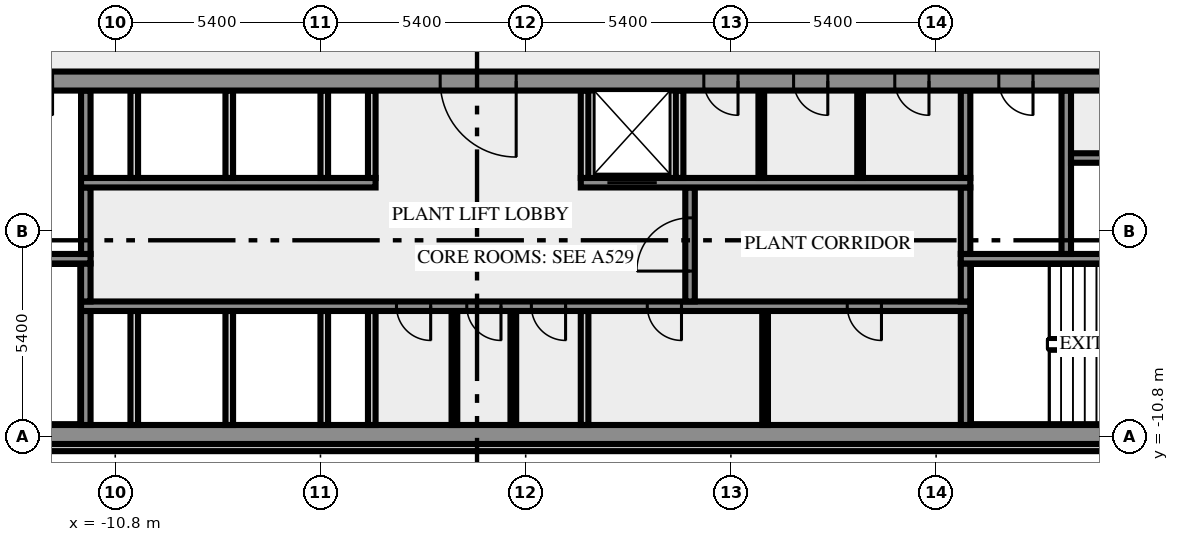
"""IFC4 building model, lengths in metres.
Left out: names, types, materials, properties, quantities, classifications, styles, units other than length and angle.
Written with IfcOpenShell. Run it as: python <this file> out.ifc"""

import sys

from ifc_helpers import new_model, si_unit, direction, frame, frame_2d, origin, place, context, subcontext, project, spatial, rectangle, extrude, element, fill, save


model = new_model("IFC4")
c1 = context("Model", 3, precision=1e-05, world=origin(), true_north=direction((0.0, 1.0)))
c2 = subcontext(c1, "Body", "Model", "MODEL_VIEW")
j1 = project(units=[si_unit("LENGTHUNIT", "METRE"), si_unit("PLANEANGLEUNIT", "RADIAN")], contexts=[c1])
p1 = place(None, origin())
s1 = spatial("IfcSite", under=j1, at=p1, CompositionType="ELEMENT")
p2 = place(p1, origin())
s2 = spatial("IfcBuilding", under=s1, at=p2, CompositionType="ELEMENT")
p3 = place(p2, frame((0.0, 0.0, 355.0)))
s3 = spatial("IfcBuildingStorey", under=s2, at=p3, CompositionType="ELEMENT", Elevation=355.0)
p4 = place(p3, frame((-17.444, -11.088, 0.0), z_axis=(0.0, 0.0, 1.0), x_axis=(1.0, 0.0, 0.0)))
e1 = element("IfcWall", 1, at=p4, inside=s3, PredefinedType="SOLIDWALL", context=c2, shape_type="SweptSolid", body=[
    extrude(rectangle(XDim=34.888, YDim=0.2, at=frame_2d((17.444, 0.0))), origin(), (0.0, 0.0, 1.0), 7.55),
])
p5 = place(p3, frame((-20.0, -10.75, 0.0), z_axis=(0.0, 0.0, 1.0), x_axis=(1.0, 0.0, 0.0)))
e2 = element("IfcWall", 2, at=p5, inside=s3, PredefinedType="SHEAR", context=c2, shape_type="SweptSolid", body=[
    extrude(rectangle(XDim=40.0, YDim=0.5, at=frame_2d((20.0, 0.0))), origin(), (0.0, 0.0, 1.0), 7.55),
])
p6 = place(p5, frame((0.8, 0.0, 1.0)))
e3 = element("IfcOpeningElement", 3, at=p6, cuts=e2, PredefinedType="OPENING", context=c2, shape_type="SweptSolid", body=[
    extrude(rectangle(XDim=1.2, YDim=1.2, at=frame_2d((0.6, 0.6))), frame((0.0, 0.26, 0.0), z_axis=(0.0, -1.0, 0.0), x_axis=(1.0, 0.0, 0.0)), (0.0, 0.0, 1.0), 0.52),
])
p7 = place(p5, frame((38.0, 0.0, 1.0)))
e4 = element("IfcOpeningElement", 4, at=p7, cuts=e2, PredefinedType="OPENING", context=c2, shape_type="SweptSolid", body=[
    extrude(rectangle(XDim=1.2, YDim=1.2, at=frame_2d((0.6, 0.6))), frame((0.0, 0.26, 0.0), z_axis=(0.0, -1.0, 0.0), x_axis=(1.0, 0.0, 0.0)), (0.0, 0.0, 1.0), 0.52),
])
p8 = place(p3, frame((-11.575, -10.5, 0.0), z_axis=(0.0, 0.0, 1.0), x_axis=(0.0, 1.0, 0.0)))
e5 = element("IfcWall", 5, at=p8, inside=s3, PredefinedType="SHEAR", context=c2, shape_type="SweptSolid", body=[
    extrude(rectangle(XDim=3.0, YDim=0.25, at=frame_2d((1.5, 0.0))), origin(), (0.0, 0.0, 1.0), 7.55),
])
for number, where, z_axis, x_axis in (
    (6, (-10.3, -10.5, 0.0), (0.0, 0.0, 1.0), (0.0, 1.0, 0.0)),
    (7, (-7.8, -10.5, 0.0), (0.0, 0.0, 1.0), (0.0, 1.0, 0.0)),
    (8, (-5.3, -10.5, 0.0), (0.0, 0.0, 1.0), (0.0, 1.0, 0.0)),
    (9, (-4.05, -10.5, 0.0), (0.0, 0.0, 1.0), (0.0, 1.0, 0.0)),
):
    element("IfcWall", number, at=place(p3, frame(where, z_axis=z_axis, x_axis=x_axis)), inside=s3, PredefinedType="SOLIDWALL", context=c2, shape_type="SweptSolid", body=[
        extrude(rectangle(XDim=3.0, YDim=0.2, at=frame_2d((1.5, 0.0))), origin(), (0.0, 0.0, 1.0), 7.55),
    ])
for number, where, z_axis, x_axis in (
    (10, (-1.875, -10.5, 0.0), (0.0, 0.0, 1.0), (0.0, 1.0, 0.0)),
    (11, (-0.325, -10.5, 0.0), (0.0, 0.0, 1.0), (0.0, 1.0, 0.0)),
):
    element("IfcWall", number, at=place(p3, frame(where, z_axis=z_axis, x_axis=x_axis)), inside=s3, PredefinedType="PARTITIONING", context=c2, shape_type="SweptSolid", body=[
        extrude(rectangle(XDim=3.0, YDim=0.15, at=frame_2d((1.5, 0.0))), origin(), (0.0, 0.0, 1.0), 7.55),
    ])
p9 = place(p3, frame((1.55, -10.5, 0.0), z_axis=(0.0, 0.0, 1.0), x_axis=(0.0, 1.0, 0.0)))
e12 = element("IfcWall", 12, at=p9, inside=s3, PredefinedType="SOLIDWALL", context=c2, shape_type="SweptSolid", body=[
    extrude(rectangle(XDim=3.0, YDim=0.2, at=frame_2d((1.5, 0.0))), origin(), (0.0, 0.0, 1.0), 7.55),
])
p10 = place(p3, frame((6.3, -10.5, 0.0), z_axis=(0.0, 0.0, 1.0), x_axis=(0.0, 1.0, 0.0)))
e13 = element("IfcWall", 13, at=p10, inside=s3, PredefinedType="PARTITIONING", context=c2, shape_type="SweptSolid", body=[
    extrude(rectangle(XDim=3.0, YDim=0.15, at=frame_2d((1.5, 0.0))), origin(), (0.0, 0.0, 1.0), 7.55),
])
p11 = place(p3, frame((11.575, -10.5, 0.0), z_axis=(0.0, 0.0, 1.0), x_axis=(0.0, 1.0, 0.0)))
e14 = element("IfcWall", 14, at=p11, inside=s3, PredefinedType="SHEAR", context=c2, shape_type="SweptSolid", body=[
    extrude(rectangle(XDim=3.0, YDim=0.25, at=frame_2d((1.5, 0.0))), origin(), (0.0, 0.0, 1.0), 7.55),
])
p12 = place(p3, frame((11.7, -7.375, 0.0), z_axis=(0.0, 0.0, 1.0), x_axis=(-1.0, 0.0, 0.0)))
e15 = element("IfcWall", 15, at=p12, inside=s3, PredefinedType="SHEAR", context=c2, shape_type="SweptSolid", body=[
    extrude(rectangle(XDim=23.4, YDim=0.25, at=frame_2d((11.7, 0.0))), origin(), (0.0, 0.0, 1.0), 7.55),
])
p13 = place(p12, frame((14.2, 0.0, 0.0)))
e16 = element("IfcOpeningElement", 16, at=p13, cuts=e15, PredefinedType="OPENING", context=c2, shape_type="SweptSolid", body=[
    extrude(rectangle(XDim=0.9, YDim=2.1, at=frame_2d((0.45, 1.05))), frame((0.0, 0.135, 0.0), z_axis=(0.0, -1.0, 0.0), x_axis=(1.0, 0.0, 0.0)), (0.0, 0.0, 1.0), 0.27),
])
p14 = place(p12, frame((12.35, 0.0, 0.0)))
e17 = element("IfcOpeningElement", 17, at=p14, cuts=e15, PredefinedType="OPENING", context=c2, shape_type="SweptSolid", body=[
    extrude(rectangle(XDim=0.9, YDim=2.1, at=frame_2d((0.45, 1.05))), frame((0.0, 0.135, 0.0), z_axis=(0.0, -1.0, 0.0), x_axis=(1.0, 0.0, 0.0)), (0.0, 0.0, 1.0), 0.27),
])
p15 = place(p12, frame((10.65, 0.0, 0.0)))
e18 = element("IfcOpeningElement", 18, at=p15, cuts=e15, PredefinedType="OPENING", context=c2, shape_type="SweptSolid", body=[
    extrude(rectangle(XDim=0.9, YDim=2.1, at=frame_2d((0.45, 1.05))), frame((0.0, 0.135, 0.0), z_axis=(0.0, -1.0, 0.0), x_axis=(1.0, 0.0, 0.0)), (0.0, 0.0, 1.0), 0.27),
])
p16 = place(p12, frame((7.6, 0.0, 0.0)))
e19 = element("IfcOpeningElement", 19, at=p16, cuts=e15, PredefinedType="OPENING", context=c2, shape_type="SweptSolid", body=[
    extrude(rectangle(XDim=0.9, YDim=2.1, at=frame_2d((0.45, 1.05))), frame((0.0, 0.135, 0.0), z_axis=(0.0, -1.0, 0.0), x_axis=(1.0, 0.0, 0.0)), (0.0, 0.0, 1.0), 0.27),
])
p17 = place(p12, frame((2.338, 0.0, 0.0)))
e20 = element("IfcOpeningElement", 20, at=p17, cuts=e15, PredefinedType="OPENING", context=c2, shape_type="SweptSolid", body=[
    extrude(rectangle(XDim=0.9, YDim=2.1, at=frame_2d((0.45, 1.05))), frame((0.0, 0.135, 0.0), z_axis=(0.0, -1.0, 0.0), x_axis=(1.0, 0.0, 0.0)), (0.0, 0.0, 1.0), 0.27),
])
p18 = place(p3, frame((-11.575, -7.25, 0.0), z_axis=(0.0, 0.0, 1.0), x_axis=(0.0, 1.0, 0.0)))
e21 = element("IfcWall", 21, at=p18, inside=s3, PredefinedType="SHEAR", context=c2, shape_type="SweptSolid", body=[
    extrude(rectangle(XDim=1.0, YDim=0.25, at=frame_2d((0.5, 0.0))), origin(), (0.0, 0.0, 1.0), 7.55),
])
p19 = place(p3, frame((4.325, -7.25, 0.0), z_axis=(0.0, 0.0, 1.0), x_axis=(0.0, 1.0, 0.0)))
e22 = element("IfcWall", 22, at=p19, inside=s3, PredefinedType="SHEAR", context=c2, shape_type="SweptSolid", body=[
    extrude(rectangle(XDim=3.0, YDim=0.25, at=frame_2d((1.5, 0.0))), origin(), (0.0, 0.0, 1.0), 7.55),
])
p20 = place(p19, frame((0.8, 0.0, 0.0)))
e23 = element("IfcOpeningElement", 23, at=p20, cuts=e22, PredefinedType="OPENING", context=c2, shape_type="SweptSolid", body=[
    extrude(rectangle(XDim=1.4, YDim=2.1, at=frame_2d((0.7, 1.05))), frame((0.0, 0.135, 0.0), z_axis=(0.0, -1.0, 0.0), x_axis=(1.0, 0.0, 0.0)), (0.0, 0.0, 1.0), 0.27),
])
p21 = place(p3, frame((11.575, -7.25, 0.0), z_axis=(0.0, 0.0, 1.0), x_axis=(0.0, 1.0, 0.0)))
e24 = element("IfcWall", 24, at=p21, inside=s3, PredefinedType="SHEAR", context=c2, shape_type="SweptSolid", body=[
    extrude(rectangle(XDim=1.0, YDim=0.25, at=frame_2d((0.5, 0.0))), origin(), (0.0, 0.0, 1.0), 7.55),
])
p22 = place(p3, frame((-11.45, -6.125, 0.0), z_axis=(0.0, 0.0, 1.0), x_axis=(-1.0, 0.0, 0.0)))
e25 = element("IfcWall", 25, at=p22, inside=s3, PredefinedType="SHEAR", context=c2, shape_type="SweptSolid", body=[
    extrude(rectangle(XDim=8.05, YDim=0.25, at=frame_2d((4.025, 0.0))), origin(), (0.0, 0.0, 1.0), 7.55),
])
p23 = place(p22, frame((6.2, 0.0, 0.0)))
e26 = element("IfcOpeningElement", 26, at=p23, cuts=e25, PredefinedType="OPENING", context=c2, shape_type="SweptSolid", body=[
    extrude(rectangle(XDim=1.8, YDim=2.1, at=frame_2d((0.9, 1.05))), frame((0.0, 0.135, 0.0), z_axis=(0.0, -1.0, 0.0), x_axis=(1.0, 0.0, 0.0)), (0.0, 0.0, 1.0), 0.27),
])
p24 = place(p3, frame((19.5, -6.125, 0.0), z_axis=(0.0, 0.0, 1.0), x_axis=(-1.0, 0.0, 0.0)))
e27 = element("IfcWall", 27, at=p24, inside=s3, PredefinedType="SHEAR", context=c2, shape_type="SweptSolid", body=[
    extrude(rectangle(XDim=8.05, YDim=0.25, at=frame_2d((4.025, 0.0))), origin(), (0.0, 0.0, 1.0), 7.55),
])
p25 = place(p24, frame((0.05, 0.0, 0.0)))
e28 = element("IfcOpeningElement", 28, at=p25, cuts=e27, PredefinedType="OPENING", context=c2, shape_type="SweptSolid", body=[
    extrude(rectangle(XDim=1.8, YDim=2.1, at=frame_2d((0.9, 1.05))), frame((0.0, 0.135, 0.0), z_axis=(0.0, -1.0, 0.0), x_axis=(1.0, 0.0, 0.0)), (0.0, 0.0, 1.0), 0.27),
])
for number, where, z_axis, x_axis in (
    (29, (-11.575, -6.0, 0.0), (0.0, 0.0, 1.0), (0.0, 1.0, 0.0)),
    (30, (11.575, -6.0, 0.0), (0.0, 0.0, 1.0), (0.0, 1.0, 0.0)),
):
    element("IfcWall", number, at=place(p3, frame(where, z_axis=z_axis, x_axis=x_axis)), inside=s3, PredefinedType="SHEAR", context=c2, shape_type="SweptSolid", body=[
        extrude(rectangle(XDim=1.75, YDim=0.25, at=frame_2d((0.875, 0.0))), origin(), (0.0, 0.0, 1.0), 7.55),
    ])
p26 = place(p3, frame((14.225, -6.0, 0.0), z_axis=(0.0, 0.0, 1.0), x_axis=(0.0, 1.0, 0.0)))
e31 = element("IfcWall", 31, at=p26, inside=s3, PredefinedType="SHEAR", context=c2, shape_type="SweptSolid", body=[
    extrude(rectangle(XDim=4.3, YDim=0.25, at=frame_2d((2.15, 0.0))), origin(), (0.0, 0.0, 1.0), 7.55),
])
p27 = place(p3, frame((-11.7, -4.125, 0.0), z_axis=(0.0, 0.0, 1.0), x_axis=(1.0, 0.0, 0.0)))
e32 = element("IfcWall", 32, at=p27, inside=s3, PredefinedType="SHEAR", context=c2, shape_type="SweptSolid", body=[
    extrude(rectangle(XDim=7.75, YDim=0.25, at=frame_2d((3.875, 0.0))), origin(), (0.0, 0.0, 1.0), 7.55),
])
p28 = place(p3, frame((1.45, -4.125, 0.0), z_axis=(0.0, 0.0, 1.0), x_axis=(1.0, 0.0, 0.0)))
e33 = element("IfcWall", 33, at=p28, inside=s3, PredefinedType="SHEAR", context=c2, shape_type="SweptSolid", body=[
    extrude(rectangle(XDim=10.25, YDim=0.25, at=frame_2d((5.125, 0.0))), origin(), (0.0, 0.0, 1.0), 7.55),
])
p29 = place(p28, frame((0.7, 0.0, 0.0)))
e34 = element("IfcOpeningElement", 34, at=p29, cuts=e33, PredefinedType="OPENING", context=c2, shape_type="SweptSolid", body=[
    extrude(rectangle(XDim=1.3, YDim=2.1, at=frame_2d((0.65, 1.05))), frame((0.0, 0.135, 0.0), z_axis=(0.0, -1.0, 0.0), x_axis=(1.0, 0.0, 0.0)), (0.0, 0.0, 1.0), 0.27),
])
p30 = place(p3, frame((-11.575, -4.0, 0.0), z_axis=(0.0, 0.0, 1.0), x_axis=(0.0, 1.0, 0.0)))
e35 = element("IfcWall", 35, at=p30, inside=s3, PredefinedType="SHEAR", context=c2, shape_type="SweptSolid", body=[
    extrude(rectangle(XDim=2.3, YDim=0.25, at=frame_2d((1.15, 0.0))), origin(), (0.0, 0.0, 1.0), 7.55),
])
for number, where, z_axis, x_axis in (
    (36, (-10.3, -4.0, 0.0), (0.0, 0.0, 1.0), (0.0, 1.0, 0.0)),
    (37, (-7.8, -4.0, 0.0), (0.0, 0.0, 1.0), (0.0, 1.0, 0.0)),
    (38, (-5.3, -4.0, 0.0), (0.0, 0.0, 1.0), (0.0, 1.0, 0.0)),
    (39, (-4.05, -4.0, 0.0), (0.0, 0.0, 1.0), (0.0, 1.0, 0.0)),
    (40, (1.55, -4.0, 0.0), (0.0, 0.0, 1.0), (0.0, 1.0, 0.0)),
    (41, (4.05, -4.0, 0.0), (0.0, 0.0, 1.0), (0.0, 1.0, 0.0)),
):
    element("IfcWall", number, at=place(p3, frame(where, z_axis=z_axis, x_axis=x_axis)), inside=s3, PredefinedType="SOLIDWALL", context=c2, shape_type="SweptSolid", body=[
        extrude(rectangle(XDim=2.3, YDim=0.2, at=frame_2d((1.15, 0.0))), origin(), (0.0, 0.0, 1.0), 7.55),
    ])
for number, where, z_axis, x_axis in (
    (42, (6.2, -4.0, 0.0), (0.0, 0.0, 1.0), (0.0, 1.0, 0.0)),
    (43, (8.8, -4.0, 0.0), (0.0, 0.0, 1.0), (0.0, 1.0, 0.0)),
):
    element("IfcWall", number, at=place(p3, frame(where, z_axis=z_axis, x_axis=x_axis)), inside=s3, PredefinedType="PARTITIONING", context=c2, shape_type="SweptSolid", body=[
        extrude(rectangle(XDim=2.3, YDim=0.15, at=frame_2d((1.15, 0.0))), origin(), (0.0, 0.0, 1.0), 7.55),
    ])
p31 = place(p3, frame((11.575, -4.0, 0.0), z_axis=(0.0, 0.0, 1.0), x_axis=(0.0, 1.0, 0.0)))
e44 = element("IfcWall", 44, at=p31, inside=s3, PredefinedType="SHEAR", context=c2, shape_type="SweptSolid", body=[
    extrude(rectangle(XDim=2.3, YDim=0.25, at=frame_2d((1.15, 0.0))), origin(), (0.0, 0.0, 1.0), 7.55),
])
p32 = place(p3, frame((14.35, -3.475, 0.0), z_axis=(0.0, 0.0, 1.0), x_axis=(1.0, 0.0, 0.0)))
e45 = element("IfcWall", 45, at=p32, inside=s3, PredefinedType="SHEAR", context=c2, shape_type="SweptSolid", body=[
    extrude(rectangle(XDim=3.0, YDim=0.25, at=frame_2d((1.5, 0.0))), origin(), (0.0, 0.0, 1.0), 7.55),
])
p33 = place(p3, frame((20.0, -1.45, 0.0), z_axis=(0.0, 0.0, 1.0), x_axis=(-1.0, 0.0, 0.0)))
e46 = element("IfcWall", 46, at=p33, inside=s3, PredefinedType="SHEAR", context=c2, shape_type="SweptSolid", body=[
    extrude(rectangle(XDim=40.0, YDim=0.5, at=frame_2d((20.0, 0.0))), origin(), (0.0, 0.0, 1.0), 7.55),
])
p34 = place(p33, frame((37.65, 0.0, 0.0)))
e47 = element("IfcOpeningElement", 47, at=p34, cuts=e46, PredefinedType="OPENING", context=c2, shape_type="SweptSolid", body=[
    extrude(rectangle(XDim=1.8, YDim=2.1, at=frame_2d((0.9, 1.05))), frame((0.0, 0.26, 0.0), z_axis=(0.0, -1.0, 0.0), x_axis=(1.0, 0.0, 0.0)), (0.0, 0.0, 1.0), 0.52),
])
p35 = place(p33, frame((36.238, 0.0, 0.0)))
e48 = element("IfcOpeningElement", 48, at=p35, cuts=e46, PredefinedType="OPENING", context=c2, shape_type="SweptSolid", body=[
    extrude(rectangle(XDim=0.8, YDim=2.1, at=frame_2d((0.4, 1.05))), frame((0.0, 0.26, 0.0), z_axis=(0.0, -1.0, 0.0), x_axis=(1.0, 0.0, 0.0)), (0.0, 0.0, 1.0), 0.52),
])
p36 = place(p33, frame((34.663, 0.0, 0.0)))
e49 = element("IfcOpeningElement", 49, at=p36, cuts=e46, PredefinedType="OPENING", context=c2, shape_type="SweptSolid", body=[
    extrude(rectangle(XDim=0.8, YDim=2.1, at=frame_2d((0.4, 1.05))), frame((0.0, 0.26, 0.0), z_axis=(0.0, -1.0, 0.0), x_axis=(1.0, 0.0, 0.0)), (0.0, 0.0, 1.0), 0.52),
])
p37 = place(p33, frame((32.45, 0.0, 0.0)))
e50 = element("IfcOpeningElement", 50, at=p37, cuts=e46, PredefinedType="OPENING", context=c2, shape_type="SweptSolid", body=[
    extrude(rectangle(XDim=0.9, YDim=2.1, at=frame_2d((0.45, 1.05))), frame((0.0, 0.26, 0.0), z_axis=(0.0, -1.0, 0.0), x_axis=(1.0, 0.0, 0.0)), (0.0, 0.0, 1.0), 0.52),
])
p38 = place(p33, frame((20.25, 0.0, 0.0)))
e51 = element("IfcOpeningElement", 51, at=p38, cuts=e46, PredefinedType="OPENING", context=c2, shape_type="SweptSolid", body=[
    extrude(rectangle(XDim=2.0, YDim=2.1, at=frame_2d((1.0, 1.05))), frame((0.0, 0.26, 0.0), z_axis=(0.0, -1.0, 0.0), x_axis=(1.0, 0.0, 0.0)), (0.0, 0.0, 1.0), 0.52),
])
p39 = place(p33, frame((14.413, 0.0, 0.0)))
e52 = element("IfcOpeningElement", 52, at=p39, cuts=e46, PredefinedType="OPENING", context=c2, shape_type="SweptSolid", body=[
    extrude(rectangle(XDim=0.9, YDim=2.1, at=frame_2d((0.45, 1.05))), frame((0.0, 0.26, 0.0), z_axis=(0.0, -1.0, 0.0), x_axis=(1.0, 0.0, 0.0)), (0.0, 0.0, 1.0), 0.52),
])
p40 = place(p33, frame((12.05, 0.0, 0.0)))
e53 = element("IfcOpeningElement", 53, at=p40, cuts=e46, PredefinedType="OPENING", context=c2, shape_type="SweptSolid", body=[
    extrude(rectangle(XDim=0.9, YDim=2.1, at=frame_2d((0.45, 1.05))), frame((0.0, 0.26, 0.0), z_axis=(0.0, -1.0, 0.0), x_axis=(1.0, 0.0, 0.0)), (0.0, 0.0, 1.0), 0.52),
])
p41 = place(p33, frame((9.387, 0.0, 0.0)))
e54 = element("IfcOpeningElement", 54, at=p41, cuts=e46, PredefinedType="OPENING", context=c2, shape_type="SweptSolid", body=[
    extrude(rectangle(XDim=0.9, YDim=2.1, at=frame_2d((0.45, 1.05))), frame((0.0, 0.26, 0.0), z_axis=(0.0, -1.0, 0.0), x_axis=(1.0, 0.0, 0.0)), (0.0, 0.0, 1.0), 0.52),
])
p42 = place(p33, frame((6.65, 0.0, 0.0)))
e55 = element("IfcOpeningElement", 55, at=p42, cuts=e46, PredefinedType="OPENING", context=c2, shape_type="SweptSolid", body=[
    extrude(rectangle(XDim=0.9, YDim=2.1, at=frame_2d((0.45, 1.05))), frame((0.0, 0.26, 0.0), z_axis=(0.0, -1.0, 0.0), x_axis=(1.0, 0.0, 0.0)), (0.0, 0.0, 1.0), 0.52),
])
p43 = place(p33, frame((3.7, 0.0, 0.0)))
e56 = element("IfcOpeningElement", 56, at=p43, cuts=e46, PredefinedType="OPENING", context=c2, shape_type="SweptSolid", body=[
    extrude(rectangle(XDim=0.9, YDim=2.1, at=frame_2d((0.45, 1.05))), frame((0.0, 0.26, 0.0), z_axis=(0.0, -1.0, 0.0), x_axis=(1.0, 0.0, 0.0)), (0.0, 0.0, 1.0), 0.52),
])
p44 = place(p33, frame((0.55, 0.0, 0.0)))
e57 = element("IfcOpeningElement", 57, at=p44, cuts=e46, PredefinedType="OPENING", context=c2, shape_type="SweptSolid", body=[
    extrude(rectangle(XDim=1.8, YDim=2.1, at=frame_2d((0.9, 1.05))), frame((0.0, 0.26, 0.0), z_axis=(0.0, -1.0, 0.0), x_axis=(1.0, 0.0, 0.0)), (0.0, 0.0, 1.0), 0.52),
])
p45 = place(p13, origin())
e58 = element("IfcDoor", 58, at=p45, inside=s3, OperationType="SINGLE_SWING_RIGHT", PredefinedType="DOOR", context=c2, shape_type="SweptSolid", body=[
    extrude(rectangle(XDim=0.9, YDim=2.1, at=frame_2d((0.45, 1.05))), frame((0.0, 0.025, 0.0), z_axis=(0.0, -1.0, 0.0), x_axis=(1.0, 0.0, 0.0)), (0.0, 0.0, 1.0), 0.05),
])
fill(e16, e58)
p46 = place(p14, origin())
e59 = element("IfcDoor", 59, at=p46, inside=s3, OperationType="SINGLE_SWING_RIGHT", PredefinedType="DOOR", context=c2, shape_type="SweptSolid", body=[
    extrude(rectangle(XDim=0.9, YDim=2.1, at=frame_2d((0.45, 1.05))), frame((0.0, 0.025, 0.0), z_axis=(0.0, -1.0, 0.0), x_axis=(1.0, 0.0, 0.0)), (0.0, 0.0, 1.0), 0.05),
])
fill(e17, e59)
p47 = place(p15, origin())
e60 = element("IfcDoor", 60, at=p47, inside=s3, OperationType="SINGLE_SWING_LEFT", PredefinedType="DOOR", context=c2, shape_type="SweptSolid", body=[
    extrude(rectangle(XDim=0.9, YDim=2.1, at=frame_2d((0.45, 1.05))), frame((0.0, 0.025, 0.0), z_axis=(0.0, -1.0, 0.0), x_axis=(1.0, 0.0, 0.0)), (0.0, 0.0, 1.0), 0.05),
])
fill(e18, e60)
p48 = place(p16, origin())
e61 = element("IfcDoor", 61, at=p48, inside=s3, OperationType="SINGLE_SWING_LEFT", PredefinedType="DOOR", context=c2, shape_type="SweptSolid", body=[
    extrude(rectangle(XDim=0.9, YDim=2.1, at=frame_2d((0.45, 1.05))), frame((0.0, 0.025, 0.0), z_axis=(0.0, -1.0, 0.0), x_axis=(1.0, 0.0, 0.0)), (0.0, 0.0, 1.0), 0.05),
])
fill(e19, e61)
p49 = place(p17, origin())
e62 = element("IfcDoor", 62, at=p49, inside=s3, OperationType="SINGLE_SWING_LEFT", PredefinedType="DOOR", context=c2, shape_type="SweptSolid", body=[
    extrude(rectangle(XDim=0.9, YDim=2.1, at=frame_2d((0.45, 1.05))), frame((0.0, 0.025, 0.0), z_axis=(0.0, -1.0, 0.0), x_axis=(1.0, 0.0, 0.0)), (0.0, 0.0, 1.0), 0.05),
])
fill(e20, e62)
p50 = place(p20, origin())
e63 = element("IfcDoor", 63, at=p50, inside=s3, OperationType="DOUBLE_DOOR_SINGLE_SWING", PredefinedType="DOOR", context=c2, shape_type="SweptSolid", body=[
    extrude(rectangle(XDim=1.4, YDim=2.1, at=frame_2d((0.7, 1.05))), frame((0.0, 0.025, 0.0), z_axis=(0.0, -1.0, 0.0), x_axis=(1.0, 0.0, 0.0)), (0.0, 0.0, 1.0), 0.05),
])
fill(e23, e63)
p51 = place(p29, origin())
e64 = element("IfcDoor", 64, at=p51, inside=s3, OperationType="DOUBLE_DOOR_SLIDING", PredefinedType="DOOR", context=c2, shape_type="SweptSolid", body=[
    extrude(rectangle(XDim=1.3, YDim=2.1, at=frame_2d((0.65, 1.05))), frame((0.0, 0.025, 0.0), z_axis=(0.0, -1.0, 0.0), x_axis=(1.0, 0.0, 0.0)), (0.0, 0.0, 1.0), 0.05),
])
fill(e34, e64)
p52 = place(p38, origin())
e65 = element("IfcDoor", 65, at=p52, inside=s3, OperationType="DOUBLE_DOOR_SINGLE_SWING", PredefinedType="DOOR", context=c2, shape_type="SweptSolid", body=[
    extrude(rectangle(XDim=2.0, YDim=2.1, at=frame_2d((1.0, 1.05))), frame((0.0, 0.025, 0.0), z_axis=(0.0, -1.0, 0.0), x_axis=(1.0, 0.0, 0.0)), (0.0, 0.0, 1.0), 0.05),
])
fill(e51, e65)
p53 = place(p39, origin())
e66 = element("IfcDoor", 66, at=p53, inside=s3, OperationType="SINGLE_SWING_LEFT", PredefinedType="DOOR", context=c2, shape_type="SweptSolid", body=[
    extrude(rectangle(XDim=0.9, YDim=2.1, at=frame_2d((0.45, 1.05))), frame((0.0, 0.025, 0.0), z_axis=(0.0, -1.0, 0.0), x_axis=(1.0, 0.0, 0.0)), (0.0, 0.0, 1.0), 0.05),
])
fill(e52, e66)
p54 = place(p40, origin())
e67 = element("IfcDoor", 67, at=p54, inside=s3, OperationType="SINGLE_SWING_LEFT", PredefinedType="DOOR", context=c2, shape_type="SweptSolid", body=[
    extrude(rectangle(XDim=0.9, YDim=2.1, at=frame_2d((0.45, 1.05))), frame((0.0, 0.025, 0.0), z_axis=(0.0, -1.0, 0.0), x_axis=(1.0, 0.0, 0.0)), (0.0, 0.0, 1.0), 0.05),
])
fill(e53, e67)
p55 = place(p41, origin())
e68 = element("IfcDoor", 68, at=p55, inside=s3, OperationType="SINGLE_SWING_LEFT", PredefinedType="DOOR", context=c2, shape_type="SweptSolid", body=[
    extrude(rectangle(XDim=0.9, YDim=2.1, at=frame_2d((0.45, 1.05))), frame((0.0, 0.025, 0.0), z_axis=(0.0, -1.0, 0.0), x_axis=(1.0, 0.0, 0.0)), (0.0, 0.0, 1.0), 0.05),
])
fill(e54, e68)
p56 = place(p42, origin())
e69 = element("IfcDoor", 69, at=p56, inside=s3, OperationType="SINGLE_SWING_LEFT", PredefinedType="DOOR", context=c2, shape_type="SweptSolid", body=[
    extrude(rectangle(XDim=0.9, YDim=2.1, at=frame_2d((0.45, 1.05))), frame((0.0, 0.025, 0.0), z_axis=(0.0, -1.0, 0.0), x_axis=(1.0, 0.0, 0.0)), (0.0, 0.0, 1.0), 0.05),
])
fill(e55, e69)
save(model, sys.argv[1])
